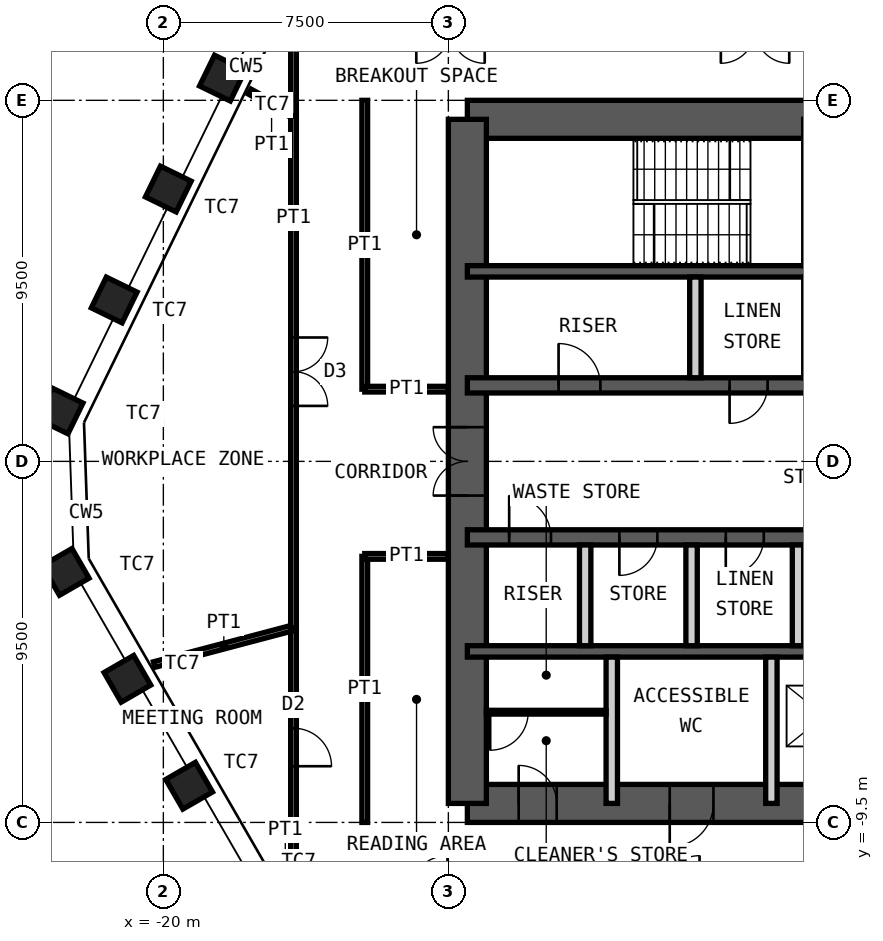
"""IFC4 building model, lengths in metres.
Left out: names, types, materials, properties, quantities, classifications, styles, units other than length and angle.
Written with IfcOpenShell. Run it as: python <this file> out.ifc"""

import sys

from ifc_helpers import new_model, si_unit, direction, frame, frame_2d, origin, origin_2d, place, context, subcontext, project, spatial, rectangle, hollow_rectangle, extrude, element, fill, save


model = new_model("IFC4")
c1 = context("Model", 3, precision=1e-05, world=origin(), true_north=direction((0.0, 1.0)))
c2 = subcontext(c1, "Body", "Model", "MODEL_VIEW")
j1 = project(units=[si_unit("LENGTHUNIT", "METRE"), si_unit("PLANEANGLEUNIT", "RADIAN")], contexts=[c1])
p1 = place(None, origin())
s1 = spatial("IfcSite", under=j1, at=p1, CompositionType="ELEMENT")
p2 = place(p1, origin())
s2 = spatial("IfcBuilding", under=s1, at=p2, CompositionType="ELEMENT")
p3 = place(p2, frame((0.0, 0.0, 295.6)))
s3 = spatial("IfcBuildingStorey", under=s2, at=p3, CompositionType="ELEMENT", Elevation=295.6)
for number, where, z_axis, x_axis in (
    (1, (-19.322, -8.534, 0.0), (0.0, 0.0, 1.0), (0.5, -0.866, 0.0)),
    (2, (-20.946, -5.721, 0.0), (0.0, 0.0, 1.0), (0.5, -0.866, 0.0)),
    (3, (-22.57, -2.908, 0.0), (0.0, 0.0, 1.0), (0.5, -0.866, 0.0)),
    (4, (-22.717, 1.327, 0.0), (0.0, 0.0, 1.0), (-0.438, -0.899, 0.0)),
    (5, (-21.293, 4.246, 0.0), (0.0, 0.0, 1.0), (-0.438, -0.899, 0.0)),
    (6, (-19.87, 7.166, 0.0), (0.0, 0.0, 1.0), (-0.438, -0.899, 0.0)),
    (7, (-18.446, 10.085, 0.0), (0.0, 0.0, 1.0), (-0.438, -0.899, 0.0)),
):
    element("IfcColumn", number, at=place(p3, frame(where, z_axis=z_axis, x_axis=x_axis)), inside=s3, PredefinedType="COLUMN", context=c2, shape_type="SweptSolid", body=[
        extrude(hollow_rectangle(XDim=0.9, YDim=0.9, WallThickness=0.06, at=origin_2d()), origin(), (0.0, 0.0, 1.0), 4.2),
    ])
p4 = place(p3, frame((-12.0, 9.0, 0.0), z_axis=(0.0, 0.0, 1.0), x_axis=(1.0, 0.0, 0.0)))
e8 = element("IfcWall", 8, at=p4, inside=s3, PredefinedType="SHEAR", context=c2, shape_type="SweptSolid", body=[
    extrude(rectangle(XDim=24.0, YDim=1.0, at=frame_2d((12.0, 0.0))), origin(), (0.0, 0.0, 1.0), 4.2),
])
p5 = place(p4, frame((10.4, 0.0, 0.0)))
e9 = element("IfcOpeningElement", 9, at=p5, cuts=e8, PredefinedType="OPENING", context=c2, shape_type="SweptSolid", body=[
    extrude(rectangle(XDim=1.0, YDim=2.1, at=frame_2d((0.5, 1.05))), frame((0.0, 0.51, 0.0), z_axis=(0.0, -1.0, 0.0), x_axis=(1.0, 0.0, 0.0)), (0.0, 0.0, 1.0), 1.02),
])
p6 = place(p4, frame((17.6, 0.0, 0.0)))
e10 = element("IfcOpeningElement", 10, at=p6, cuts=e8, PredefinedType="OPENING", context=c2, shape_type="SweptSolid", body=[
    extrude(rectangle(XDim=0.9, YDim=2.1, at=frame_2d((0.45, 1.05))), frame((0.0, 0.51, 0.0), z_axis=(0.0, -1.0, 0.0), x_axis=(1.0, 0.0, 0.0)), (0.0, 0.0, 1.0), 1.02),
])
p7 = place(p4, frame((21.9, 0.0, 0.0)))
e11 = element("IfcOpeningElement", 11, at=p7, cuts=e8, PredefinedType="OPENING", context=c2, shape_type="SweptSolid", body=[
    extrude(rectangle(XDim=0.9, YDim=2.1, at=frame_2d((0.45, 1.05))), frame((0.0, 0.51, 0.0), z_axis=(0.0, -1.0, 0.0), x_axis=(1.0, 0.0, 0.0)), (0.0, 0.0, 1.0), 1.02),
])
p8 = place(p3, frame((-12.0, -9.0, 0.0), z_axis=(0.0, 0.0, 1.0), x_axis=(1.0, 0.0, 0.0)))
e12 = element("IfcWall", 12, at=p8, inside=s3, PredefinedType="SHEAR", context=c2, shape_type="SweptSolid", body=[
    extrude(rectangle(XDim=24.0, YDim=1.0, at=frame_2d((12.0, 0.0))), origin(), (0.0, 0.0, 1.0), 4.2),
])
p9 = place(p8, frame((1.35, 0.0, 0.0)))
e13 = element("IfcOpeningElement", 13, at=p9, cuts=e12, PredefinedType="OPENING", context=c2, shape_type="SweptSolid", body=[
    extrude(rectangle(XDim=1.0, YDim=2.1, at=frame_2d((0.5, 1.05))), frame((0.0, 0.51, 0.0), z_axis=(0.0, -1.0, 0.0), x_axis=(1.0, 0.0, 0.0)), (0.0, 0.0, 1.0), 1.02),
])
p10 = place(p8, frame((5.325, 0.0, 0.0)))
e14 = element("IfcOpeningElement", 14, at=p10, cuts=e12, PredefinedType="OPENING", context=c2, shape_type="SweptSolid", body=[
    extrude(rectangle(XDim=1.15, YDim=2.1, at=frame_2d((0.575, 1.05))), frame((0.0, 0.51, 0.0), z_axis=(0.0, -1.0, 0.0), x_axis=(1.0, 0.0, 0.0)), (0.0, 0.0, 1.0), 1.02),
])
p11 = place(p8, frame((12.6, 0.0, 0.0)))
e15 = element("IfcOpeningElement", 15, at=p11, cuts=e12, PredefinedType="OPENING", context=c2, shape_type="SweptSolid", body=[
    extrude(rectangle(XDim=1.0, YDim=2.1, at=frame_2d((0.5, 1.05))), frame((0.0, 0.51, 0.0), z_axis=(0.0, -1.0, 0.0), x_axis=(1.0, 0.0, 0.0)), (0.0, 0.0, 1.0), 1.02),
])
p12 = place(p3, frame((-12.0, -9.0, 0.0), z_axis=(0.0, 0.0, 1.0), x_axis=(0.0, 1.0, 0.0)))
e16 = element("IfcWall", 16, at=p12, inside=s3, PredefinedType="SHEAR", context=c2, shape_type="SweptSolid", body=[
    extrude(rectangle(XDim=18.0, YDim=1.0, at=frame_2d((9.0, 0.0))), origin(), (0.0, 0.0, 1.0), 4.2),
])
p13 = place(p12, frame((8.1, 0.0, 0.0)))
e17 = element("IfcOpeningElement", 17, at=p13, cuts=e16, PredefinedType="OPENING", context=c2, shape_type="SweptSolid", body=[
    extrude(rectangle(XDim=1.8, YDim=2.1, at=frame_2d((0.9, 1.05))), frame((0.0, 0.51, 0.0), z_axis=(0.0, -1.0, 0.0), x_axis=(1.0, 0.0, 0.0)), (0.0, 0.0, 1.0), 1.02),
])
p14 = place(p3, frame((-12.0, 5.0, 0.0), z_axis=(0.0, 0.0, 1.0), x_axis=(1.0, 0.0, 0.0)))
e18 = element("IfcWall", 18, at=p14, inside=s3, PredefinedType="SHEAR", context=c2, shape_type="SweptSolid", body=[
    extrude(rectangle(XDim=24.0, YDim=0.3, at=frame_2d((12.0, 0.0))), origin(), (0.0, 0.0, 1.0), 4.2),
])
p15 = place(p3, frame((-12.0, 2.0, 0.0), z_axis=(0.0, 0.0, 1.0), x_axis=(1.0, 0.0, 0.0)))
e19 = element("IfcWall", 19, at=p15, inside=s3, PredefinedType="SHEAR", context=c2, shape_type="SweptSolid", body=[
    extrude(rectangle(XDim=24.0, YDim=0.4, at=frame_2d((12.0, 0.0))), origin(), (0.0, 0.0, 1.0), 4.2),
])
p16 = place(p15, frame((2.4, 0.0, 0.0)))
e20 = element("IfcOpeningElement", 20, at=p16, cuts=e19, PredefinedType="OPENING", context=c2, shape_type="SweptSolid", body=[
    extrude(rectangle(XDim=1.1, YDim=2.1, at=frame_2d((0.55, 1.05))), frame((0.0, 0.21, 0.0), z_axis=(0.0, -1.0, 0.0), x_axis=(1.0, 0.0, 0.0)), (0.0, 0.0, 1.0), 0.42),
])
p17 = place(p15, frame((22.0, 0.0, 0.0)))
e21 = element("IfcOpeningElement", 21, at=p17, cuts=e19, PredefinedType="OPENING", context=c2, shape_type="SweptSolid", body=[
    extrude(rectangle(XDim=1.1, YDim=2.1, at=frame_2d((0.55, 1.05))), frame((0.0, 0.21, 0.0), z_axis=(0.0, -1.0, 0.0), x_axis=(1.0, 0.0, 0.0)), (0.0, 0.0, 1.0), 0.42),
])
p18 = place(p15, frame((10.15, 0.0, 0.0)))
e22 = element("IfcOpeningElement", 22, at=p18, cuts=e19, PredefinedType="OPENING", context=c2, shape_type="SweptSolid", body=[
    extrude(rectangle(XDim=1.0, YDim=2.1, at=frame_2d((0.5, 1.05))), frame((0.0, 0.21, 0.0), z_axis=(0.0, -1.0, 0.0), x_axis=(1.0, 0.0, 0.0)), (0.0, 0.0, 1.0), 0.42),
])
p19 = place(p15, frame((6.9, 0.0, 0.0)))
e23 = element("IfcOpeningElement", 23, at=p19, cuts=e19, PredefinedType="OPENING", context=c2, shape_type="SweptSolid", body=[
    extrude(rectangle(XDim=1.0, YDim=2.1, at=frame_2d((0.5, 1.05))), frame((0.0, 0.21, 0.0), z_axis=(0.0, -1.0, 0.0), x_axis=(1.0, 0.0, 0.0)), (0.0, 0.0, 1.0), 0.42),
])
p20 = place(p15, frame((13.35, 0.0, 0.0)))
e24 = element("IfcOpeningElement", 24, at=p20, cuts=e19, PredefinedType="OPENING", context=c2, shape_type="SweptSolid", body=[
    extrude(rectangle(XDim=1.1, YDim=2.4, at=frame_2d((0.55, 1.2))), frame((0.0, 0.21, 0.0), z_axis=(0.0, -1.0, 0.0), x_axis=(1.0, 0.0, 0.0)), (0.0, 0.0, 1.0), 0.42),
])
p21 = place(p15, frame((16.15, 0.0, 0.0)))
e25 = element("IfcOpeningElement", 25, at=p21, cuts=e19, PredefinedType="OPENING", context=c2, shape_type="SweptSolid", body=[
    extrude(rectangle(XDim=1.1, YDim=2.4, at=frame_2d((0.55, 1.2))), frame((0.0, 0.21, 0.0), z_axis=(0.0, -1.0, 0.0), x_axis=(1.0, 0.0, 0.0)), (0.0, 0.0, 1.0), 0.42),
])
p22 = place(p15, frame((19.0, 0.0, 0.0)))
e26 = element("IfcOpeningElement", 26, at=p22, cuts=e19, PredefinedType="OPENING", context=c2, shape_type="SweptSolid", body=[
    extrude(rectangle(XDim=1.0, YDim=2.1, at=frame_2d((0.5, 1.05))), frame((0.0, 0.21, 0.0), z_axis=(0.0, -1.0, 0.0), x_axis=(1.0, 0.0, 0.0)), (0.0, 0.0, 1.0), 0.42),
])
p23 = place(p3, frame((-12.0, -2.0, 0.0), z_axis=(0.0, 0.0, 1.0), x_axis=(1.0, 0.0, 0.0)))
e27 = element("IfcWall", 27, at=p23, inside=s3, PredefinedType="SHEAR", context=c2, shape_type="SweptSolid", body=[
    extrude(rectangle(XDim=24.0, YDim=0.4, at=frame_2d((12.0, 0.0))), origin(), (0.0, 0.0, 1.0), 4.2),
])
p24 = place(p23, frame((1.1, 0.0, 0.0)))
e28 = element("IfcOpeningElement", 28, at=p24, cuts=e27, PredefinedType="OPENING", context=c2, shape_type="SweptSolid", body=[
    extrude(rectangle(XDim=1.1, YDim=2.1, at=frame_2d((0.55, 1.05))), frame((0.0, 0.21, 0.0), z_axis=(0.0, -1.0, 0.0), x_axis=(1.0, 0.0, 0.0)), (0.0, 0.0, 1.0), 0.42),
])
p25 = place(p23, frame((13.55, 0.0, 0.0)))
e29 = element("IfcOpeningElement", 29, at=p25, cuts=e27, PredefinedType="OPENING", context=c2, shape_type="SweptSolid", body=[
    extrude(rectangle(XDim=1.1, YDim=2.1, at=frame_2d((0.55, 1.05))), frame((0.0, 0.21, 0.0), z_axis=(0.0, -1.0, 0.0), x_axis=(1.0, 0.0, 0.0)), (0.0, 0.0, 1.0), 0.42),
])
p26 = place(p23, frame((20.7, 0.0, 0.0)))
e30 = element("IfcOpeningElement", 30, at=p26, cuts=e27, PredefinedType="OPENING", context=c2, shape_type="SweptSolid", body=[
    extrude(rectangle(XDim=1.1, YDim=2.1, at=frame_2d((0.55, 1.05))), frame((0.0, 0.21, 0.0), z_axis=(0.0, -1.0, 0.0), x_axis=(1.0, 0.0, 0.0)), (0.0, 0.0, 1.0), 0.42),
])
p27 = place(p23, frame((4.0, 0.0, 0.0)))
e31 = element("IfcOpeningElement", 31, at=p27, cuts=e27, PredefinedType="OPENING", context=c2, shape_type="SweptSolid", body=[
    extrude(rectangle(XDim=1.0, YDim=2.1, at=frame_2d((0.5, 1.05))), frame((0.0, 0.21, 0.0), z_axis=(0.0, -1.0, 0.0), x_axis=(1.0, 0.0, 0.0)), (0.0, 0.0, 1.0), 0.42),
])
p28 = place(p23, frame((6.8, 0.0, 0.0)))
e32 = element("IfcOpeningElement", 32, at=p28, cuts=e27, PredefinedType="OPENING", context=c2, shape_type="SweptSolid", body=[
    extrude(rectangle(XDim=1.0, YDim=2.1, at=frame_2d((0.5, 1.05))), frame((0.0, 0.21, 0.0), z_axis=(0.0, -1.0, 0.0), x_axis=(1.0, 0.0, 0.0)), (0.0, 0.0, 1.0), 0.42),
])
p29 = place(p23, frame((9.6, 0.0, 0.0)))
e33 = element("IfcOpeningElement", 33, at=p29, cuts=e27, PredefinedType="OPENING", context=c2, shape_type="SweptSolid", body=[
    extrude(rectangle(XDim=1.0, YDim=2.1, at=frame_2d((0.5, 1.05))), frame((0.0, 0.21, 0.0), z_axis=(0.0, -1.0, 0.0), x_axis=(1.0, 0.0, 0.0)), (0.0, 0.0, 1.0), 0.42),
])
p30 = place(p3, frame((-12.0, -5.0, 0.0), z_axis=(0.0, 0.0, 1.0), x_axis=(1.0, 0.0, 0.0)))
e34 = element("IfcWall", 34, at=p30, inside=s3, PredefinedType="SHEAR", context=c2, shape_type="SweptSolid", body=[
    extrude(rectangle(XDim=24.0, YDim=0.3, at=frame_2d((12.0, 0.0))), origin(), (0.0, 0.0, 1.0), 4.2),
])
p31 = place(p3, frame((-3.0, 5.15, 0.0), z_axis=(0.0, 0.0, 1.0), x_axis=(0.0, 1.0, 0.0)))
e35 = element("IfcWall", 35, at=p31, inside=s3, PredefinedType="PARTITIONING", context=c2, shape_type="SweptSolid", body=[
    extrude(rectangle(XDim=3.85, YDim=0.3, at=frame_2d((1.925, 0.0))), origin(), (0.0, 0.0, 1.0), 3.98),
])
p32 = place(p31, frame((1.425, 0.0, 0.0)))
e36 = element("IfcOpeningElement", 36, at=p32, cuts=e35, PredefinedType="OPENING", context=c2, shape_type="SweptSolid", body=[
    extrude(rectangle(XDim=1.0, YDim=2.1, at=frame_2d((0.5, 1.05))), frame((0.0, 0.16, 0.0), z_axis=(0.0, -1.0, 0.0), x_axis=(1.0, 0.0, 0.0)), (0.0, 0.0, 1.0), 0.32),
])
for number, where, z_axis, x_axis in (
    (37, (-6.0, 2.2, 0.0), (0.0, 0.0, 1.0), (0.0, 1.0, 0.0)),
    (38, (-3.0, 2.2, 0.0), (0.0, 0.0, 1.0), (0.0, 1.0, 0.0)),
    (39, (-8.9, -4.85, 0.0), (0.0, 0.0, 1.0), (0.0, 1.0, 0.0)),
    (40, (-6.1, -4.85, 0.0), (0.0, 0.0, 1.0), (0.0, 1.0, 0.0)),
    (41, (-3.3, -4.85, 0.0), (0.0, 0.0, 1.0), (0.0, 1.0, 0.0)),
):
    element("IfcWall", number, at=place(p3, frame(where, z_axis=z_axis, x_axis=x_axis)), inside=s3, PredefinedType="PARTITIONING", context=c2, shape_type="SweptSolid", body=[
        extrude(rectangle(XDim=2.65, YDim=0.3, at=frame_2d((1.325, 0.0))), origin(), (0.0, 0.0, 1.0), 3.98),
    ])
for number, where, z_axis, x_axis in (
    (42, (-8.2, -9.0, 0.0), (0.0, 0.0, 1.0), (0.0, 1.0, 0.0)),
    (43, (-4.0, -9.0, 0.0), (0.0, 0.0, 1.0), (0.0, 1.0, 0.0)),
):
    element("IfcWall", number, at=place(p3, frame(where, z_axis=z_axis, x_axis=x_axis)), inside=s3, PredefinedType="PARTITIONING", context=c2, shape_type="SweptSolid", body=[
        extrude(rectangle(XDim=3.85, YDim=0.3, at=frame_2d((1.925, 0.0))), origin(), (0.0, 0.0, 1.0), 3.98),
    ])
p33 = place(p3, frame((-11.5, -6.6, 0.0), z_axis=(0.0, 0.0, 1.0), x_axis=(1.0, 0.0, 0.0)))
e44 = element("IfcWall", 44, at=p33, inside=s3, PredefinedType="PARTITIONING", context=c2, shape_type="SweptSolid", body=[
    extrude(rectangle(XDim=3.15, YDim=0.1, at=frame_2d((1.575, 0.0))), origin(), (0.0, 0.0, 1.0), 3.98),
])
p34 = place(p33, frame((0.1, 0.0, 0.0)))
e45 = element("IfcOpeningElement", 45, at=p34, cuts=e44, PredefinedType="OPENING", context=c2, shape_type="SweptSolid", body=[
    extrude(rectangle(XDim=1.0, YDim=2.4, at=frame_2d((0.5, 1.2))), frame((0.0, 0.06, 0.0), z_axis=(0.0, -1.0, 0.0), x_axis=(1.0, 0.0, 0.0)), (0.0, 0.0, 1.0), 0.12),
])
p35 = place(p3, frame((-17.729, 9.73, 0.0), z_axis=(0.0, 0.0, 1.0), x_axis=(0.87667364743, -0.481085559855, 0.0)))
e46 = element("IfcWall", 46, at=p35, inside=s3, PredefinedType="PARTITIONING", context=c2, shape_type="SweptSolid", body=[
    extrude(rectangle(XDim=1.316, YDim=0.15, at=frame_2d((0.658, 0.0))), origin(), (0.0, 0.0, 1.0), 2.93),
])
p36 = place(p3, frame((-16.575, 9.097, 0.0), z_axis=(0.0, 0.0, 1.0), x_axis=(0.0, 1.0, 0.0)))
e47 = element("IfcWall", 47, at=p36, inside=s3, PredefinedType="PARTITIONING", context=c2, shape_type="SweptSolid", body=[
    extrude(rectangle(XDim=2.278, YDim=0.15, at=frame_2d((1.139, 0.0))), origin(), (0.0, 0.0, 1.0), 4.03),
])
p37 = place(p3, frame((-16.575, -10.665, 0.0), z_axis=(0.0, 0.0, 1.0), x_axis=(0.0, 1.0, 0.0)))
e48 = element("IfcWall", 48, at=p37, inside=s3, PredefinedType="PARTITIONING", context=c2, shape_type="SweptSolid", body=[
    extrude(rectangle(XDim=6.288, YDim=0.15, at=frame_2d((3.144, 0.0))), origin(), (0.0, 0.0, 1.0), 4.03),
])
p38 = place(p37, frame((2.644, 0.0, 0.0)))
e49 = element("IfcOpeningElement", 49, at=p38, cuts=e48, PredefinedType="OPENING", context=c2, shape_type="SweptSolid", body=[
    extrude(rectangle(XDim=1.0, YDim=2.4, at=frame_2d((0.5, 1.2))), frame((0.0, 0.085, 0.0), z_axis=(0.0, -1.0, 0.0), x_axis=(1.0, 0.0, 0.0)), (0.0, 0.0, 1.0), 0.17),
])
p39 = place(p3, frame((-20.243, -5.346, 0.0), z_axis=(0.0, 0.0, 1.0), x_axis=(0.966843218991, 0.255370691137, 0.0)))
e50 = element("IfcWall", 50, at=p39, inside=s3, PredefinedType="PARTITIONING", context=c2, shape_type="SweptSolid", body=[
    extrude(rectangle(XDim=3.793, YDim=0.15, at=frame_2d((1.897, 0.0))), origin(), (0.0, 0.0, 1.0), 2.93),
])
p40 = place(p3, frame((-16.575, -4.377, 0.0), z_axis=(0.0, 0.0, 1.0), x_axis=(0.0, 1.0, 0.0)))
e51 = element("IfcWall", 51, at=p40, inside=s3, PredefinedType="PARTITIONING", context=c2, shape_type="SweptSolid", body=[
    extrude(rectangle(XDim=13.474, YDim=0.15, at=frame_2d((6.737, 0.0))), origin(), (0.0, 0.0, 1.0), 4.03),
])
p41 = place(p40, frame((5.837, 0.0, 0.0)))
e52 = element("IfcOpeningElement", 52, at=p41, cuts=e51, PredefinedType="OPENING", context=c2, shape_type="SweptSolid", body=[
    extrude(rectangle(XDim=1.8, YDim=2.4, at=frame_2d((0.9, 1.2))), frame((0.0, 0.085, 0.0), z_axis=(0.0, -1.0, 0.0), x_axis=(1.0, 0.0, 0.0)), (0.0, 0.0, 1.0), 0.17),
])
p42 = place(p3, frame((-14.7, 1.9, 0.0), z_axis=(0.0, 0.0, 1.0), x_axis=(0.0, 1.0, 0.0)))
e53 = element("IfcWall", 53, at=p42, inside=s3, PredefinedType="PARTITIONING", context=c2, shape_type="SweptSolid", body=[
    extrude(rectangle(XDim=7.6, YDim=0.15, at=frame_2d((3.8, 0.0))), origin(), (0.0, 0.0, 1.0), 4.03),
])
p43 = place(p3, frame((-12.5, 1.9, 0.0), z_axis=(0.0, 0.0, 1.0), x_axis=(-1.0, 0.0, 0.0)))
e54 = element("IfcWall", 54, at=p43, inside=s3, PredefinedType="PARTITIONING", context=c2, shape_type="SweptSolid", body=[
    extrude(rectangle(XDim=2.2, YDim=0.15, at=frame_2d((1.1, 0.0))), origin(), (0.0, 0.0, 1.0), 3.13),
])
p44 = place(p3, frame((-14.7, -9.5, 0.0), z_axis=(0.0, 0.0, 1.0), x_axis=(0.0, 1.0, 0.0)))
e55 = element("IfcWall", 55, at=p44, inside=s3, PredefinedType="PARTITIONING", context=c2, shape_type="SweptSolid", body=[
    extrude(rectangle(XDim=7.0, YDim=0.15, at=frame_2d((3.5, 0.0))), origin(), (0.0, 0.0, 1.0), 4.03),
])
p45 = place(p3, frame((-12.5, -2.5, 0.0), z_axis=(0.0, 0.0, 1.0), x_axis=(-1.0, 0.0, 0.0)))
e56 = element("IfcWall", 56, at=p45, inside=s3, PredefinedType="PARTITIONING", context=c2, shape_type="SweptSolid", body=[
    extrude(rectangle(XDim=2.2, YDim=0.15, at=frame_2d((1.1, 0.0))), origin(), (0.0, 0.0, 1.0), 3.13),
])
p46 = place(p9, origin())
e57 = element("IfcDoor", 57, at=p46, inside=s3, OperationType="SINGLE_SWING_RIGHT", PredefinedType="DOOR", context=c2, shape_type="SweptSolid", body=[
    extrude(rectangle(XDim=1.0, YDim=2.1, at=frame_2d((0.5, 1.05))), frame((0.0, 0.025, 0.0), z_axis=(0.0, -1.0, 0.0), x_axis=(1.0, 0.0, 0.0)), (0.0, 0.0, 1.0), 0.05),
])
fill(e13, e57)
p47 = place(p10, origin())
e58 = element("IfcDoor", 58, at=p47, inside=s3, OperationType="SINGLE_SWING_LEFT", PredefinedType="DOOR", context=c2, shape_type="SweptSolid", body=[
    extrude(rectangle(XDim=1.15, YDim=2.1, at=frame_2d((0.575, 1.05))), frame((0.0, 0.025, 0.0), z_axis=(0.0, -1.0, 0.0), x_axis=(1.0, 0.0, 0.0)), (0.0, 0.0, 1.0), 0.05),
])
fill(e14, e58)
p48 = place(p16, origin())
e59 = element("IfcDoor", 59, at=p48, inside=s3, OperationType="SINGLE_SWING_RIGHT", PredefinedType="DOOR", context=c2, shape_type="SweptSolid", body=[
    extrude(rectangle(XDim=1.1, YDim=2.1, at=frame_2d((0.55, 1.05))), frame((0.0, 0.025, 0.0), z_axis=(0.0, -1.0, 0.0), x_axis=(1.0, 0.0, 0.0)), (0.0, 0.0, 1.0), 0.05),
])
fill(e20, e59)
p49 = place(p24, origin())
e60 = element("IfcDoor", 60, at=p49, inside=s3, OperationType="SINGLE_SWING_RIGHT", PredefinedType="DOOR", context=c2, shape_type="SweptSolid", body=[
    extrude(rectangle(XDim=1.1, YDim=2.1, at=frame_2d((0.55, 1.05))), frame((0.0, 0.025, 0.0), z_axis=(0.0, -1.0, 0.0), x_axis=(1.0, 0.0, 0.0)), (0.0, 0.0, 1.0), 0.05),
])
fill(e28, e60)
p50 = place(p13, origin())
e61 = element("IfcDoor", 61, at=p50, inside=s3, OperationType="DOUBLE_DOOR_DOUBLE_SWING", PredefinedType="DOOR", context=c2, shape_type="SweptSolid", body=[
    extrude(rectangle(XDim=1.8, YDim=2.1, at=frame_2d((0.9, 1.05))), frame((0.0, 0.025, 0.0), z_axis=(0.0, -1.0, 0.0), x_axis=(1.0, 0.0, 0.0)), (0.0, 0.0, 1.0), 0.05),
])
fill(e17, e61)
p51 = place(p19, origin())
e62 = element("IfcDoor", 62, at=p51, inside=s3, OperationType="SINGLE_SWING_LEFT", PredefinedType="DOOR", context=c2, shape_type="SweptSolid", body=[
    extrude(rectangle(XDim=1.0, YDim=2.1, at=frame_2d((0.5, 1.05))), frame((0.0, 0.025, 0.0), z_axis=(0.0, -1.0, 0.0), x_axis=(1.0, 0.0, 0.0)), (0.0, 0.0, 1.0), 0.05),
])
fill(e23, e62)
p52 = place(p27, origin())
e63 = element("IfcDoor", 63, at=p52, inside=s3, OperationType="SINGLE_SWING_LEFT", PredefinedType="DOOR", context=c2, shape_type="SweptSolid", body=[
    extrude(rectangle(XDim=1.0, YDim=2.1, at=frame_2d((0.5, 1.05))), frame((0.0, 0.025, 0.0), z_axis=(0.0, -1.0, 0.0), x_axis=(1.0, 0.0, 0.0)), (0.0, 0.0, 1.0), 0.05),
])
fill(e31, e63)
p53 = place(p28, origin())
e64 = element("IfcDoor", 64, at=p53, inside=s3, OperationType="SINGLE_SWING_LEFT", PredefinedType="DOOR", context=c2, shape_type="SweptSolid", body=[
    extrude(rectangle(XDim=1.0, YDim=2.1, at=frame_2d((0.5, 1.05))), frame((0.0, 0.025, 0.0), z_axis=(0.0, -1.0, 0.0), x_axis=(1.0, 0.0, 0.0)), (0.0, 0.0, 1.0), 0.05),
])
fill(e32, e64)
p54 = place(p34, origin())
e65 = element("IfcDoor", 65, at=p54, inside=s3, OperationType="SINGLE_SWING_LEFT", PredefinedType="DOOR", context=c2, shape_type="SweptSolid", body=[
    extrude(rectangle(XDim=1.0, YDim=2.4, at=frame_2d((0.5, 1.2))), frame((0.0, 0.025, 0.0), z_axis=(0.0, -1.0, 0.0), x_axis=(1.0, 0.0, 0.0)), (0.0, 0.0, 1.0), 0.05),
])
fill(e45, e65)
p55 = place(p38, origin())
e66 = element("IfcDoor", 66, at=p55, inside=s3, OperationType="SINGLE_SWING_LEFT", PredefinedType="DOOR", context=c2, shape_type="SweptSolid", body=[
    extrude(rectangle(XDim=1.0, YDim=2.4, at=frame_2d((0.5, 1.2))), frame((0.0, 0.025, 0.0), z_axis=(0.0, -1.0, 0.0), x_axis=(1.0, 0.0, 0.0)), (0.0, 0.0, 1.0), 0.05),
])
fill(e49, e66)
p56 = place(p41, origin())
e67 = element("IfcDoor", 67, at=p56, inside=s3, OperationType="DOUBLE_DOOR_DOUBLE_SWING", PredefinedType="DOOR", context=c2, shape_type="SweptSolid", body=[
    extrude(rectangle(XDim=1.8, YDim=2.4, at=frame_2d((0.9, 1.2))), frame((0.0, 0.025, 0.0), z_axis=(0.0, -1.0, 0.0), x_axis=(1.0, 0.0, 0.0)), (0.0, 0.0, 1.0), 0.05),
])
fill(e52, e67)
save(model, sys.argv[1])
